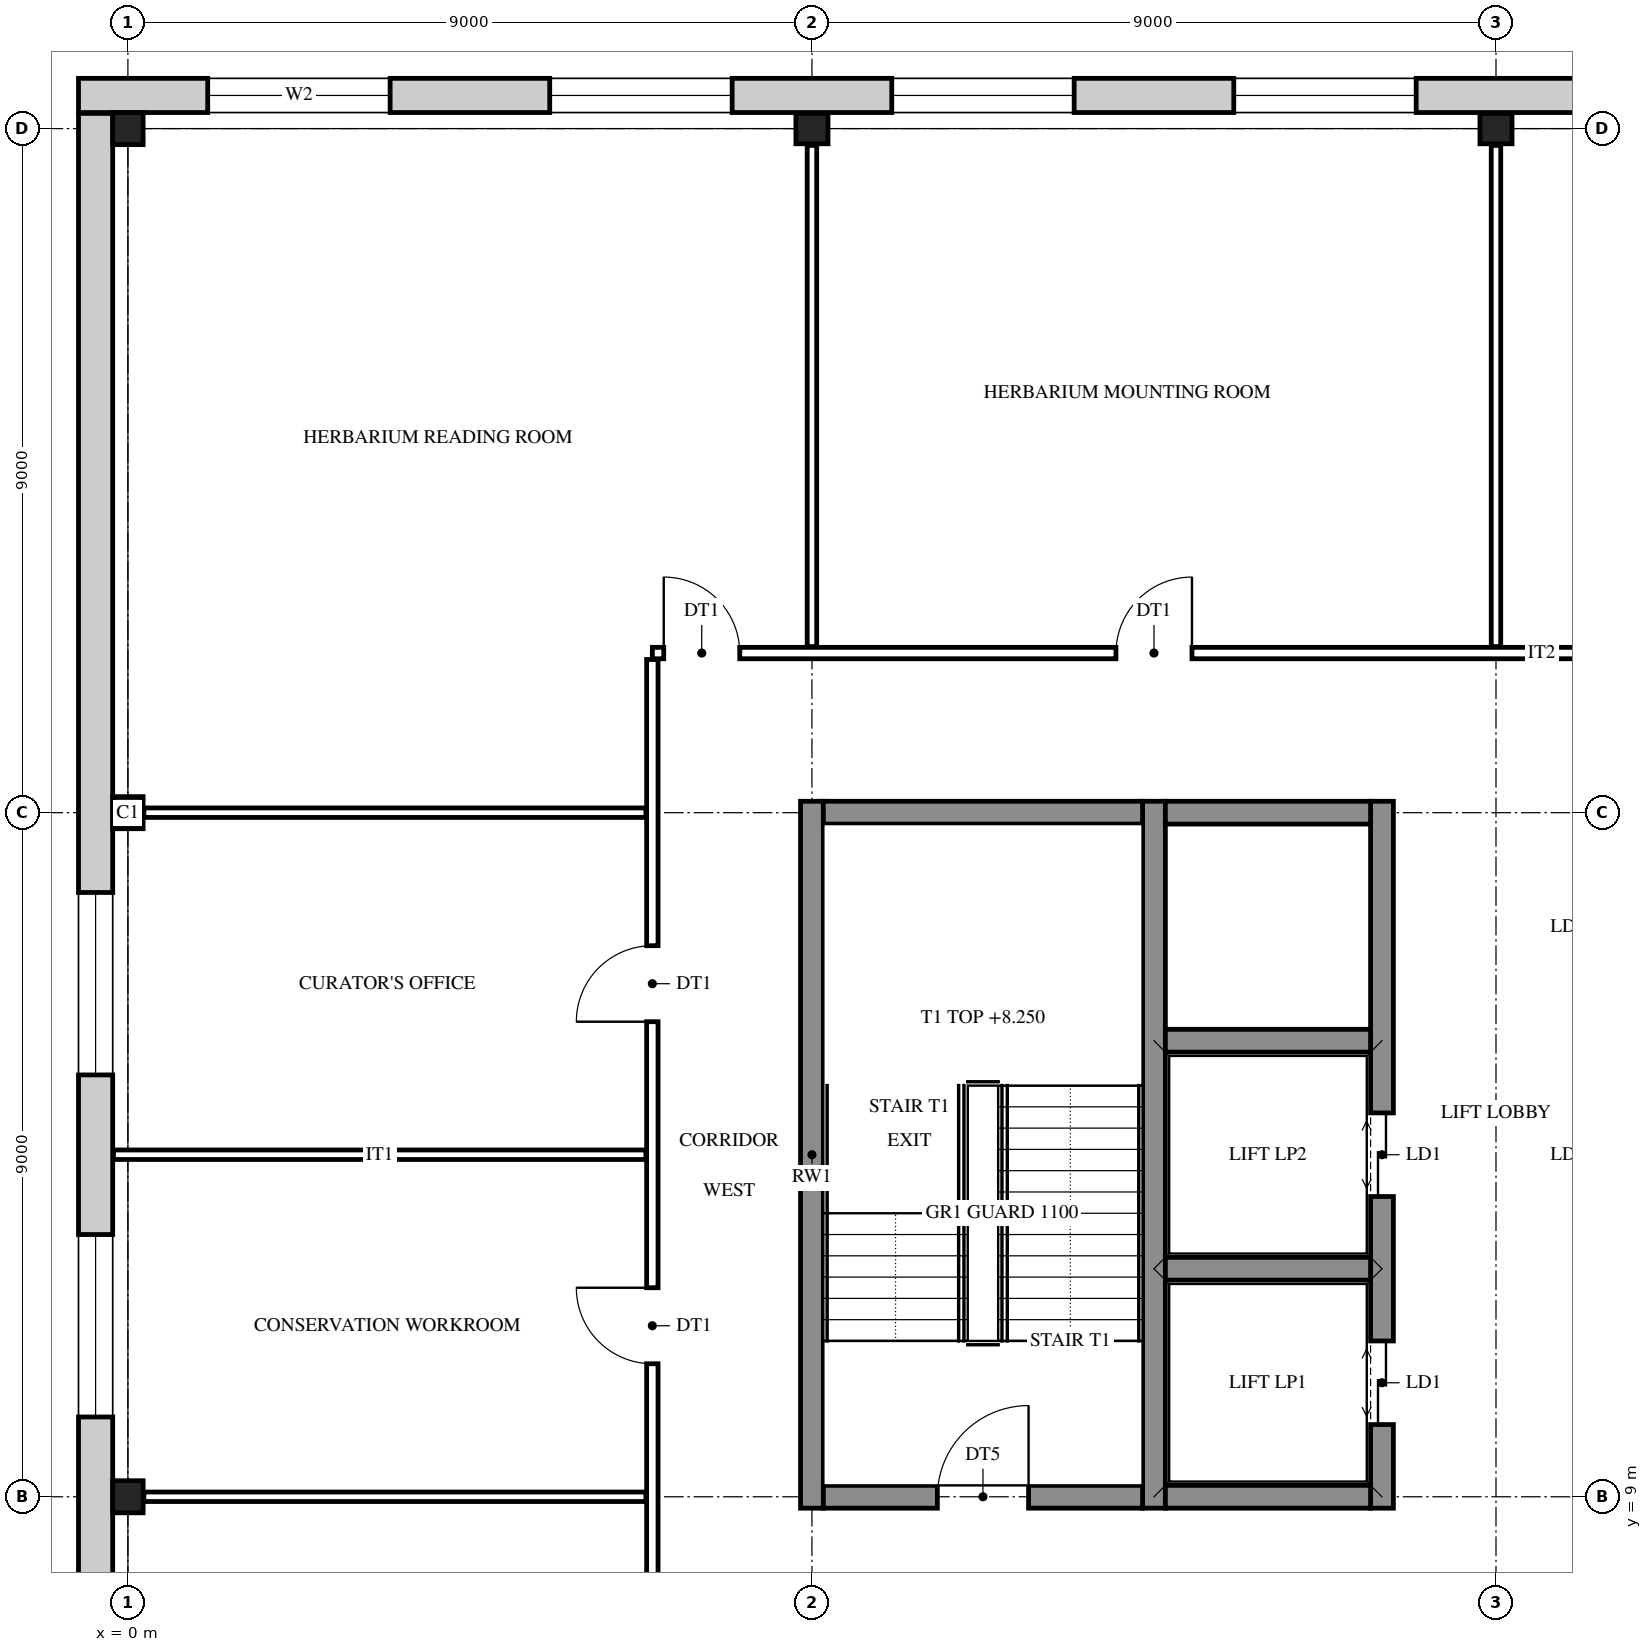
"""IFC4 building model, lengths in metres.
Left out: names, types, materials, properties, quantities, classifications, styles, units other than length and angle.
Written with IfcOpenShell. Run it as: python <this file> out.ifc"""

import sys

from ifc_helpers import new_model, si_unit, direction, frame, frame_2d, origin, origin_2d, place, context, subcontext, project, spatial, rectangle, i_section, extrude, element, fill, save


model = new_model("IFC4")
c1 = context("Model", 3, precision=1e-05, world=origin(), true_north=direction((0.0, 1.0)))
c2 = subcontext(c1, "Body", "Model", "MODEL_VIEW")
j1 = project(units=[si_unit("LENGTHUNIT", "METRE"), si_unit("PLANEANGLEUNIT", "RADIAN")], contexts=[c1])
p1 = place(None, origin())
s1 = spatial("IfcSite", under=j1, at=p1, CompositionType="ELEMENT")
p2 = place(p1, origin())
s2 = spatial("IfcBuilding", under=s1, at=p2, CompositionType="ELEMENT")
p3 = place(p2, frame((0.0, 0.0, 6.0)))
s3 = spatial("IfcBuildingStorey", under=s2, at=p3, CompositionType="ELEMENT", Elevation=6.0)
for number, where, z_axis, x_axis in (
    (1, (0.0, 9.0, 0.0), (0.0, 0.0, 1.0), (1.0, 0.0, 0.0)),
    (2, (0.0, 18.0, 0.0), (0.0, 0.0, 1.0), (1.0, 0.0, 0.0)),
    (3, (0.0, 27.0, 0.0), (0.0, 0.0, 1.0), (1.0, 0.0, 0.0)),
    (4, (9.0, 27.0, 0.0), (0.0, 0.0, 1.0), (0.0, 1.0, 0.0)),
    (5, (18.0, 27.0, 0.0), (0.0, 0.0, 1.0), (0.0, 1.0, 0.0)),
):
    element("IfcColumn", number, at=place(p3, frame(where, z_axis=z_axis, x_axis=x_axis)), inside=s3, PredefinedType="COLUMN", context=c2, shape_type="SweptSolid", body=[
        extrude(i_section(OverallWidth=0.4, OverallDepth=0.422, WebThickness=0.028, FlangeThickness=0.036, at=origin_2d()), origin(), (0.0, 0.0, 1.0), 4.5),
    ])
for number, where, z_axis, x_axis in (
    (6, (9.0, 8.85, 0.0), (0.0, 0.0, 1.0), (0.0, 1.0, 0.0)),
    (7, (13.5, 8.85, 0.0), (0.0, 0.0, 1.0), (0.0, 1.0, 0.0)),
):
    element("IfcWall", number, at=place(p3, frame(where, z_axis=z_axis, x_axis=x_axis)), inside=s3, PredefinedType="SHEAR", context=c2, shape_type="SweptSolid", body=[
        extrude(rectangle(XDim=9.3, YDim=0.3, at=frame_2d((4.65, 0.0))), origin(), (0.0, 0.0, 1.0), 4.5),
    ])
p4 = place(p3, frame((16.5, 8.85, 0.0), z_axis=(0.0, 0.0, 1.0), x_axis=(0.0, 1.0, 0.0)))
e8 = element("IfcWall", 8, at=p4, inside=s3, PredefinedType="SHEAR", context=c2, shape_type="SweptSolid", body=[
    extrude(rectangle(XDim=9.3, YDim=0.3, at=frame_2d((4.65, 0.0))), origin(), (0.0, 0.0, 1.0), 4.5),
])
p5 = place(p4, frame((1.1, 0.0, 0.0)))
e9 = element("IfcOpeningElement", 9, at=p5, cuts=e8, PredefinedType="OPENING", context=c2, shape_type="SweptSolid", body=[
    extrude(rectangle(XDim=1.1, YDim=2.1, at=frame_2d((0.55, 1.05))), frame((0.0, 0.16, 0.0), z_axis=(0.0, -1.0, 0.0), x_axis=(1.0, 0.0, 0.0)), (0.0, 0.0, 1.0), 0.32),
])
p6 = place(p4, frame((4.1, 0.0, 0.0)))
e10 = element("IfcOpeningElement", 10, at=p6, cuts=e8, PredefinedType="OPENING", context=c2, shape_type="SweptSolid", body=[
    extrude(rectangle(XDim=1.1, YDim=2.1, at=frame_2d((0.55, 1.05))), frame((0.0, 0.16, 0.0), z_axis=(0.0, -1.0, 0.0), x_axis=(1.0, 0.0, 0.0)), (0.0, 0.0, 1.0), 0.32),
])
p7 = place(p3, frame((9.15, 9.0, 0.0), z_axis=(0.0, 0.0, 1.0), x_axis=(1.0, 0.0, 0.0)))
e11 = element("IfcWall", 11, at=p7, inside=s3, PredefinedType="SHEAR", context=c2, shape_type="SweptSolid", body=[
    extrude(rectangle(XDim=4.2, YDim=0.3, at=frame_2d((2.1, 0.0))), origin(), (0.0, 0.0, 1.0), 4.5),
])
p8 = place(p7, frame((1.5, 0.0, 0.0)))
e12 = element("IfcOpeningElement", 12, at=p8, cuts=e11, PredefinedType="OPENING", context=c2, shape_type="SweptSolid", body=[
    extrude(rectangle(XDim=1.2, YDim=2.1, at=frame_2d((0.6, 1.05))), frame((0.0, 0.16, 0.0), z_axis=(0.0, -1.0, 0.0), x_axis=(1.0, 0.0, 0.0)), (0.0, 0.0, 1.0), 0.32),
])
for number, where, z_axis, x_axis in (
    (13, (13.65, 9.0, 0.0), (0.0, 0.0, 1.0), (1.0, 0.0, 0.0)),
    (14, (13.65, 12.0, 0.0), (0.0, 0.0, 1.0), (1.0, 0.0, 0.0)),
    (15, (13.65, 15.0, 0.0), (0.0, 0.0, 1.0), (1.0, 0.0, 0.0)),
):
    element("IfcWall", number, at=place(p3, frame(where, z_axis=z_axis, x_axis=x_axis)), inside=s3, PredefinedType="SHEAR", context=c2, shape_type="SweptSolid", body=[
        extrude(rectangle(XDim=2.7, YDim=0.3, at=frame_2d((1.35, 0.0))), origin(), (0.0, 0.0, 1.0), 4.5),
    ])
p9 = place(p3, frame((9.15, 18.0, 0.0), z_axis=(0.0, 0.0, 1.0), x_axis=(1.0, 0.0, 0.0)))
e16 = element("IfcWall", 16, at=p9, inside=s3, PredefinedType="SHEAR", context=c2, shape_type="SweptSolid", body=[
    extrude(rectangle(XDim=4.2, YDim=0.3, at=frame_2d((2.1, 0.0))), origin(), (0.0, 0.0, 1.0), 4.5),
])
p10 = place(p3, frame((13.65, 18.0, 0.0), z_axis=(0.0, 0.0, 1.0), x_axis=(1.0, 0.0, 0.0)))
e17 = element("IfcWall", 17, at=p10, inside=s3, PredefinedType="SHEAR", context=c2, shape_type="SweptSolid", body=[
    extrude(rectangle(XDim=2.7, YDim=0.3, at=frame_2d((1.35, 0.0))), origin(), (0.0, 0.0, 1.0), 4.5),
])
p11 = place(p3, frame((-0.425, -0.2, 0.0), z_axis=(0.0, 0.0, 1.0), x_axis=(0.0, 1.0, 0.0)))
e18 = element("IfcWall", 18, at=p11, inside=s3, PredefinedType="STANDARD", context=c2, shape_type="SweptSolid", body=[
    extrude(rectangle(XDim=27.4, YDim=0.45, at=frame_2d((13.7, 0.0))), origin(), (0.0, 0.0, 1.0), 4.5),
])
p12 = place(p11, frame((10.25, 0.0, 0.9)))
e19 = element("IfcOpeningElement", 19, at=p12, cuts=e18, PredefinedType="OPENING", context=c2, shape_type="SweptSolid", body=[
    extrude(rectangle(XDim=2.4, YDim=2.8, at=frame_2d((1.2, 1.4))), frame((0.0, 0.235, 0.0), z_axis=(0.0, -1.0, 0.0), x_axis=(1.0, 0.0, 0.0)), (0.0, 0.0, 1.0), 0.47),
])
p13 = place(p11, frame((14.75, 0.0, 0.9)))
e20 = element("IfcOpeningElement", 20, at=p13, cuts=e18, PredefinedType="OPENING", context=c2, shape_type="SweptSolid", body=[
    extrude(rectangle(XDim=2.4, YDim=2.8, at=frame_2d((1.2, 1.4))), frame((0.0, 0.235, 0.0), z_axis=(0.0, -1.0, 0.0), x_axis=(1.0, 0.0, 0.0)), (0.0, 0.0, 1.0), 0.47),
])
p14 = place(p3, frame((-0.65, 27.436, 0.0), z_axis=(0.0, 0.0, 1.0), x_axis=(1.0, 0.0, 0.0)))
e21 = element("IfcWall", 21, at=p14, inside=s3, PredefinedType="STANDARD", context=c2, shape_type="SweptSolid", body=[
    extrude(rectangle(XDim=32.8, YDim=0.45, at=frame_2d((16.4, 0.0))), origin(), (0.0, 0.0, 1.0), 4.5),
])
p15 = place(p14, frame((1.7, 0.0, 0.9)))
e22 = element("IfcOpeningElement", 22, at=p15, cuts=e21, PredefinedType="OPENING", context=c2, shape_type="SweptSolid", body=[
    extrude(rectangle(XDim=2.4, YDim=2.8, at=frame_2d((1.2, 1.4))), frame((0.0, 0.235, 0.0), z_axis=(0.0, -1.0, 0.0), x_axis=(1.0, 0.0, 0.0)), (0.0, 0.0, 1.0), 0.47),
])
p16 = place(p14, frame((6.2, 0.0, 0.9)))
e23 = element("IfcOpeningElement", 23, at=p16, cuts=e21, PredefinedType="OPENING", context=c2, shape_type="SweptSolid", body=[
    extrude(rectangle(XDim=2.4, YDim=2.8, at=frame_2d((1.2, 1.4))), frame((0.0, 0.235, 0.0), z_axis=(0.0, -1.0, 0.0), x_axis=(1.0, 0.0, 0.0)), (0.0, 0.0, 1.0), 0.47),
])
p17 = place(p14, frame((10.7, 0.0, 0.9)))
e24 = element("IfcOpeningElement", 24, at=p17, cuts=e21, PredefinedType="OPENING", context=c2, shape_type="SweptSolid", body=[
    extrude(rectangle(XDim=2.4, YDim=2.8, at=frame_2d((1.2, 1.4))), frame((0.0, 0.235, 0.0), z_axis=(0.0, -1.0, 0.0), x_axis=(1.0, 0.0, 0.0)), (0.0, 0.0, 1.0), 0.47),
])
p18 = place(p14, frame((15.2, 0.0, 0.9)))
e25 = element("IfcOpeningElement", 25, at=p18, cuts=e21, PredefinedType="OPENING", context=c2, shape_type="SweptSolid", body=[
    extrude(rectangle(XDim=2.4, YDim=2.8, at=frame_2d((1.2, 1.4))), frame((0.0, 0.235, 0.0), z_axis=(0.0, -1.0, 0.0), x_axis=(1.0, 0.0, 0.0)), (0.0, 0.0, 1.0), 0.47),
])
p19 = place(p14, frame((19.7, 0.0, 0.9)))
e26 = element("IfcOpeningElement", 26, at=p19, cuts=e21, PredefinedType="OPENING", context=c2, shape_type="SweptSolid", body=[
    extrude(rectangle(XDim=2.4, YDim=2.8, at=frame_2d((1.2, 1.4))), frame((0.0, 0.235, 0.0), z_axis=(0.0, -1.0, 0.0), x_axis=(1.0, 0.0, 0.0)), (0.0, 0.0, 1.0), 0.47),
])
p20 = place(p14, frame((24.2, 0.0, 0.9)))
e27 = element("IfcOpeningElement", 27, at=p20, cuts=e21, PredefinedType="OPENING", context=c2, shape_type="SweptSolid", body=[
    extrude(rectangle(XDim=2.4, YDim=2.8, at=frame_2d((1.2, 1.4))), frame((0.0, 0.235, 0.0), z_axis=(0.0, -1.0, 0.0), x_axis=(1.0, 0.0, 0.0)), (0.0, 0.0, 1.0), 0.47),
])
p21 = place(p14, frame((28.7, 0.0, 0.9)))
e28 = element("IfcOpeningElement", 28, at=p21, cuts=e21, PredefinedType="OPENING", context=c2, shape_type="SweptSolid", body=[
    extrude(rectangle(XDim=2.4, YDim=2.8, at=frame_2d((1.2, 1.4))), frame((0.0, 0.235, 0.0), z_axis=(0.0, -1.0, 0.0), x_axis=(1.0, 0.0, 0.0)), (0.0, 0.0, 1.0), 0.47),
])
p22 = place(p3, frame((6.9, 6.9, 0.0), z_axis=(0.0, 0.0, 1.0), x_axis=(0.0, 1.0, 0.0)))
e29 = element("IfcWall", 29, at=p22, inside=s3, PredefinedType="PARTITIONING", context=c2, shape_type="SweptSolid", body=[
    extrude(rectangle(XDim=13.115, YDim=0.15, at=frame_2d((6.558, 0.0))), origin(), (0.0, 0.0, 1.0), 3.718),
])
p23 = place(p22, frame((3.85, 0.0, 0.0)))
e30 = element("IfcOpeningElement", 30, at=p23, cuts=e29, PredefinedType="OPENING", context=c2, shape_type="SweptSolid", body=[
    extrude(rectangle(XDim=1.0, YDim=2.1, at=frame_2d((0.5, 1.05))), frame((0.0, 0.085, 0.0), z_axis=(0.0, -1.0, 0.0), x_axis=(1.0, 0.0, 0.0)), (0.0, 0.0, 1.0), 0.17),
])
p24 = place(p22, frame((8.35, 0.0, 0.0)))
e31 = element("IfcOpeningElement", 31, at=p24, cuts=e29, PredefinedType="OPENING", context=c2, shape_type="SweptSolid", body=[
    extrude(rectangle(XDim=1.0, YDim=2.1, at=frame_2d((0.5, 1.05))), frame((0.0, 0.085, 0.0), z_axis=(0.0, -1.0, 0.0), x_axis=(1.0, 0.0, 0.0)), (0.0, 0.0, 1.0), 0.17),
])
for number, where, z_axis, x_axis in (
    (32, (9.0, 20.185, 0.0), (0.0, 0.0, 1.0), (0.0, 1.0, 0.0)),
    (33, (18.0, 20.185, 0.0), (0.0, 0.0, 1.0), (0.0, 1.0, 0.0)),
):
    element("IfcWall", number, at=place(p3, frame(where, z_axis=z_axis, x_axis=x_axis)), inside=s3, PredefinedType="PARTITIONING", context=c2, shape_type="SweptSolid", body=[
        extrude(rectangle(XDim=6.594, YDim=0.125, at=frame_2d((3.297, 0.0))), origin(), (0.0, 0.0, 1.0), 3.718),
    ])
p25 = place(p3, frame((0.21, 9.0, 0.0), z_axis=(0.0, 0.0, 1.0), x_axis=(1.0, 0.0, 0.0)))
e34 = element("IfcWall", 34, at=p25, inside=s3, PredefinedType="PARTITIONING", context=c2, shape_type="SweptSolid", body=[
    extrude(rectangle(XDim=6.605, YDim=0.125, at=frame_2d((3.302, 0.0))), origin(), (0.0, 0.0, 1.0), 3.718),
])
p26 = place(p3, frame((-0.19, 13.5, 0.0), z_axis=(0.0, 0.0, 1.0), x_axis=(1.0, 0.0, 0.0)))
e35 = element("IfcWall", 35, at=p26, inside=s3, PredefinedType="PARTITIONING", context=c2, shape_type="SweptSolid", body=[
    extrude(rectangle(XDim=7.005, YDim=0.125, at=frame_2d((3.502, 0.0))), origin(), (0.0, 0.0, 1.0), 3.718),
])
p27 = place(p3, frame((0.21, 18.0, 0.0), z_axis=(0.0, 0.0, 1.0), x_axis=(1.0, 0.0, 0.0)))
e36 = element("IfcWall", 36, at=p27, inside=s3, PredefinedType="PARTITIONING", context=c2, shape_type="SweptSolid", body=[
    extrude(rectangle(XDim=6.605, YDim=0.125, at=frame_2d((3.302, 0.0))), origin(), (0.0, 0.0, 1.0), 3.718),
])
p28 = place(p3, frame((6.9, 20.1, 0.0), z_axis=(0.0, 0.0, 1.0), x_axis=(1.0, 0.0, 0.0)))
e37 = element("IfcWall", 37, at=p28, inside=s3, PredefinedType="PARTITIONING", context=c2, shape_type="SweptSolid", body=[
    extrude(rectangle(XDim=20.1, YDim=0.15, at=frame_2d((10.05, 0.0))), origin(), (0.0, 0.0, 1.0), 3.718),
])
p29 = place(p28, frame((0.15, 0.0, 0.0)))
e38 = element("IfcOpeningElement", 38, at=p29, cuts=e37, PredefinedType="OPENING", context=c2, shape_type="SweptSolid", body=[
    extrude(rectangle(XDim=1.0, YDim=2.1, at=frame_2d((0.5, 1.05))), frame((0.0, 0.085, 0.0), z_axis=(0.0, -1.0, 0.0), x_axis=(1.0, 0.0, 0.0)), (0.0, 0.0, 1.0), 0.17),
])
p30 = place(p28, frame((6.1, 0.0, 0.0)))
e39 = element("IfcOpeningElement", 39, at=p30, cuts=e37, PredefinedType="OPENING", context=c2, shape_type="SweptSolid", body=[
    extrude(rectangle(XDim=1.0, YDim=2.1, at=frame_2d((0.5, 1.05))), frame((0.0, 0.085, 0.0), z_axis=(0.0, -1.0, 0.0), x_axis=(1.0, 0.0, 0.0)), (0.0, 0.0, 1.0), 0.17),
])
p31 = place(p28, frame((16.3, 0.0, 0.0)))
e40 = element("IfcOpeningElement", 40, at=p31, cuts=e37, PredefinedType="OPENING", context=c2, shape_type="SweptSolid", body=[
    extrude(rectangle(XDim=1.0, YDim=2.1, at=frame_2d((0.5, 1.05))), frame((0.0, 0.085, 0.0), z_axis=(0.0, -1.0, 0.0), x_axis=(1.0, 0.0, 0.0)), (0.0, 0.0, 1.0), 0.17),
])
p32 = place(p12, origin())
e41 = element("IfcWindow", 41, at=p32, inside=s3, PartitioningType="SINGLE_PANEL", PredefinedType="WINDOW", context=c2, shape_type="SweptSolid", body=[
    extrude(rectangle(XDim=2.4, YDim=2.8, at=frame_2d((1.2, 1.4))), frame((0.0, 0.03, 0.0), z_axis=(0.0, -1.0, 0.0), x_axis=(1.0, 0.0, 0.0)), (0.0, 0.0, 1.0), 0.06),
])
fill(e19, e41)
p33 = place(p13, origin())
e42 = element("IfcWindow", 42, at=p33, inside=s3, PartitioningType="SINGLE_PANEL", PredefinedType="WINDOW", context=c2, shape_type="SweptSolid", body=[
    extrude(rectangle(XDim=2.4, YDim=2.8, at=frame_2d((1.2, 1.4))), frame((0.0, 0.03, 0.0), z_axis=(0.0, -1.0, 0.0), x_axis=(1.0, 0.0, 0.0)), (0.0, 0.0, 1.0), 0.06),
])
fill(e20, e42)
p34 = place(p15, origin())
e43 = element("IfcWindow", 43, at=p34, inside=s3, PartitioningType="SINGLE_PANEL", PredefinedType="WINDOW", context=c2, shape_type="SweptSolid", body=[
    extrude(rectangle(XDim=2.4, YDim=2.8, at=frame_2d((1.2, 1.4))), frame((0.0, 0.03, 0.0), z_axis=(0.0, -1.0, 0.0), x_axis=(1.0, 0.0, 0.0)), (0.0, 0.0, 1.0), 0.06),
])
fill(e22, e43)
p35 = place(p16, origin())
e44 = element("IfcWindow", 44, at=p35, inside=s3, PartitioningType="SINGLE_PANEL", PredefinedType="WINDOW", context=c2, shape_type="SweptSolid", body=[
    extrude(rectangle(XDim=2.4, YDim=2.8, at=frame_2d((1.2, 1.4))), frame((0.0, 0.03, 0.0), z_axis=(0.0, -1.0, 0.0), x_axis=(1.0, 0.0, 0.0)), (0.0, 0.0, 1.0), 0.06),
])
fill(e23, e44)
p36 = place(p17, origin())
e45 = element("IfcWindow", 45, at=p36, inside=s3, PartitioningType="SINGLE_PANEL", PredefinedType="WINDOW", context=c2, shape_type="SweptSolid", body=[
    extrude(rectangle(XDim=2.4, YDim=2.8, at=frame_2d((1.2, 1.4))), frame((0.0, 0.03, 0.0), z_axis=(0.0, -1.0, 0.0), x_axis=(1.0, 0.0, 0.0)), (0.0, 0.0, 1.0), 0.06),
])
fill(e24, e45)
p37 = place(p18, origin())
e46 = element("IfcWindow", 46, at=p37, inside=s3, PartitioningType="SINGLE_PANEL", PredefinedType="WINDOW", context=c2, shape_type="SweptSolid", body=[
    extrude(rectangle(XDim=2.4, YDim=2.8, at=frame_2d((1.2, 1.4))), frame((0.0, 0.03, 0.0), z_axis=(0.0, -1.0, 0.0), x_axis=(1.0, 0.0, 0.0)), (0.0, 0.0, 1.0), 0.06),
])
fill(e25, e46)
p38 = place(p8, origin())
e47 = element("IfcDoor", 47, at=p38, inside=s3, OperationType="SINGLE_SWING_RIGHT", PredefinedType="DOOR", context=c2, shape_type="SweptSolid", body=[
    extrude(rectangle(XDim=1.2, YDim=2.1, at=frame_2d((0.6, 1.05))), frame((0.0, 0.025, 0.0), z_axis=(0.0, -1.0, 0.0), x_axis=(1.0, 0.0, 0.0)), (0.0, 0.0, 1.0), 0.05),
])
fill(e12, e47)
p39 = place(p29, origin())
e48 = element("IfcDoor", 48, at=p39, inside=s3, OperationType="SINGLE_SWING_LEFT", PredefinedType="DOOR", context=c2, shape_type="SweptSolid", body=[
    extrude(rectangle(XDim=1.0, YDim=2.1, at=frame_2d((0.5, 1.05))), frame((0.0, 0.025, 0.0), z_axis=(0.0, -1.0, 0.0), x_axis=(1.0, 0.0, 0.0)), (0.0, 0.0, 1.0), 0.05),
])
fill(e38, e48)
p40 = place(p30, origin())
e49 = element("IfcDoor", 49, at=p40, inside=s3, OperationType="SINGLE_SWING_RIGHT", PredefinedType="DOOR", context=c2, shape_type="SweptSolid", body=[
    extrude(rectangle(XDim=1.0, YDim=2.1, at=frame_2d((0.5, 1.05))), frame((0.0, 0.025, 0.0), z_axis=(0.0, -1.0, 0.0), x_axis=(1.0, 0.0, 0.0)), (0.0, 0.0, 1.0), 0.05),
])
fill(e39, e49)
p41 = place(p23, origin())
e50 = element("IfcDoor", 50, at=p41, inside=s3, OperationType="SINGLE_SWING_RIGHT", PredefinedType="DOOR", context=c2, shape_type="SweptSolid", body=[
    extrude(rectangle(XDim=1.0, YDim=2.1, at=frame_2d((0.5, 1.05))), frame((0.0, 0.025, 0.0), z_axis=(0.0, -1.0, 0.0), x_axis=(1.0, 0.0, 0.0)), (0.0, 0.0, 1.0), 0.05),
])
fill(e30, e50)
p42 = place(p24, origin())
e51 = element("IfcDoor", 51, at=p42, inside=s3, OperationType="SINGLE_SWING_LEFT", PredefinedType="DOOR", context=c2, shape_type="SweptSolid", body=[
    extrude(rectangle(XDim=1.0, YDim=2.1, at=frame_2d((0.5, 1.05))), frame((0.0, 0.025, 0.0), z_axis=(0.0, -1.0, 0.0), x_axis=(1.0, 0.0, 0.0)), (0.0, 0.0, 1.0), 0.05),
])
fill(e31, e51)
p43 = place(p5, origin())
e52 = element("IfcDoor", 52, at=p43, inside=s3, OperationType="DOUBLE_DOOR_SLIDING", PredefinedType="DOOR", context=c2, shape_type="SweptSolid", body=[
    extrude(rectangle(XDim=1.1, YDim=2.1, at=frame_2d((0.55, 1.05))), frame((0.0, 0.025, 0.0), z_axis=(0.0, -1.0, 0.0), x_axis=(1.0, 0.0, 0.0)), (0.0, 0.0, 1.0), 0.05),
])
fill(e9, e52)
p44 = place(p6, origin())
e53 = element("IfcDoor", 53, at=p44, inside=s3, OperationType="DOUBLE_DOOR_SLIDING", PredefinedType="DOOR", context=c2, shape_type="SweptSolid", body=[
    extrude(rectangle(XDim=1.1, YDim=2.1, at=frame_2d((0.55, 1.05))), frame((0.0, 0.025, 0.0), z_axis=(0.0, -1.0, 0.0), x_axis=(1.0, 0.0, 0.0)), (0.0, 0.0, 1.0), 0.05),
])
fill(e10, e53)
save(model, sys.argv[1])
